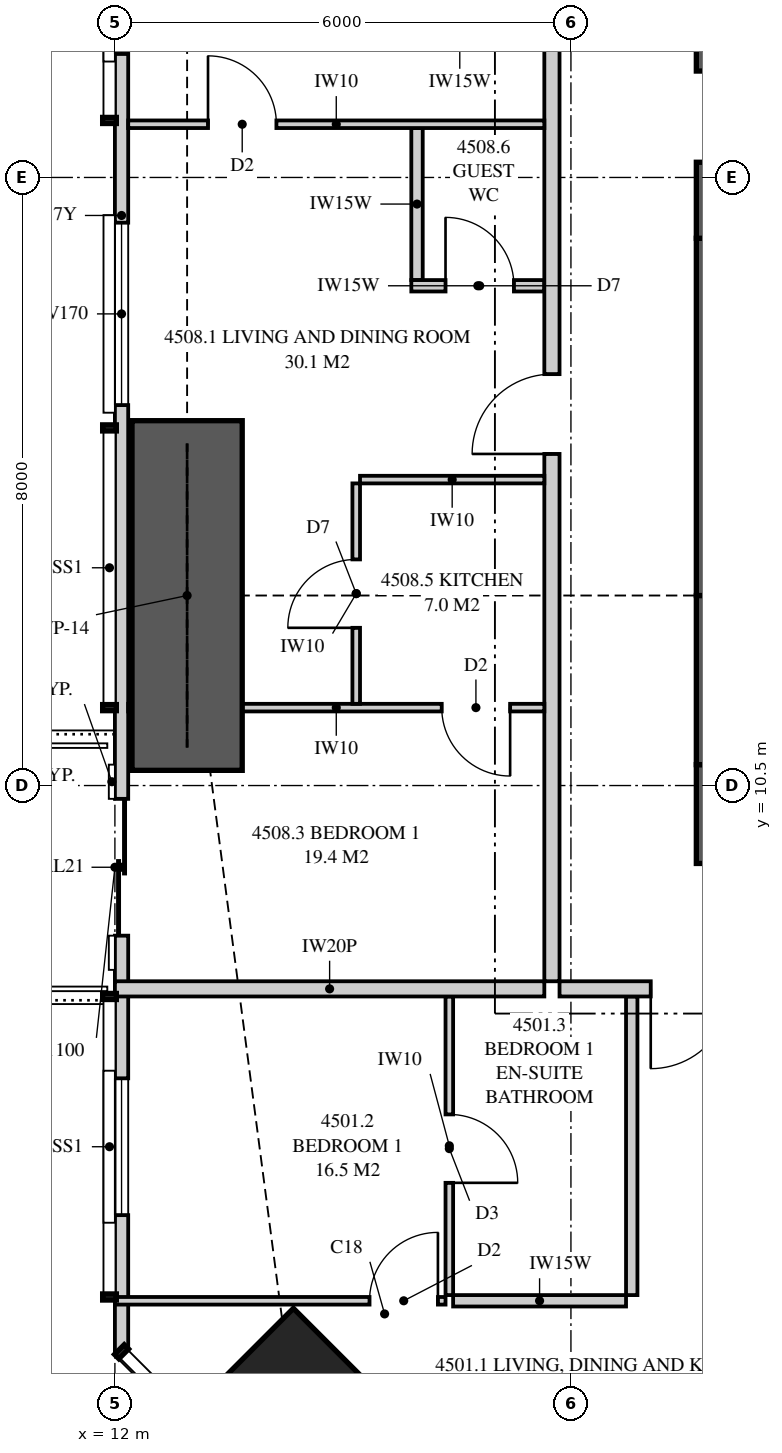
"""IFC4 building model, lengths in metres.
Left out: names, types, materials, properties, quantities, classifications, styles, units other than length and angle.
Written with IfcOpenShell. Run it as: python <this file> out.ifc"""

import sys

from ifc_helpers import new_model, si_unit, direction, frame, frame_2d, origin, origin_2d, place, context, subcontext, project, spatial, polyline, rectangle, outline, extrude, element, fill, save


model = new_model("IFC4")
c1 = context("Model", 3, precision=1e-05, world=origin(), true_north=direction((0.0, 1.0)))
c2 = subcontext(c1, "Body", "Model", "MODEL_VIEW")
j1 = project(units=[si_unit("LENGTHUNIT", "METRE"), si_unit("PLANEANGLEUNIT", "RADIAN")], contexts=[c1])
p1 = place(None, origin())
s1 = spatial("IfcSite", under=j1, at=p1, CompositionType="ELEMENT")
p2 = place(p1, origin())
s2 = spatial("IfcBuilding", under=s1, at=p2, CompositionType="ELEMENT")
p3 = place(p2, frame((0.0, 0.0, 167.75)))
s3 = spatial("IfcBuildingStorey", under=s2, at=p3, CompositionType="ELEMENT", Elevation=167.75)
p4 = place(p3, frame((14.348, 2.348, 0.0), z_axis=(0.0, 0.0, 1.0), x_axis=(0.707106781187, 0.707106781187, 0.0)))
e1 = element("IfcColumn", 1, at=p4, inside=s3, PredefinedType="COLUMN", context=c2, shape_type="SweptSolid", body=[
    extrude(rectangle(XDim=1.8, YDim=1.8, at=origin_2d()), origin(), (0.0, 0.0, 1.0), 3.35),
])
p5 = place(p3, frame((19.65, 10.125, 0.0), z_axis=(0.0, 0.0, 1.0), x_axis=(1.0, 0.0, 0.0)))
e2 = element("IfcWall", 2, at=p5, inside=s3, PredefinedType="SHEAR", context=c2, shape_type="SweptSolid", body=[
    extrude(rectangle(XDim=6.35, YDim=1.3, at=frame_2d((3.175, 0.0))), origin(), (0.0, 0.0, 1.0), 3.35),
])
p6 = place(p5, frame((4.775, 0.0, 0.0)))
e3 = element("IfcOpeningElement", 3, at=p6, cuts=e2, PredefinedType="OPENING", context=c2, shape_type="SweptSolid", body=[
    extrude(rectangle(XDim=0.75, YDim=2.1, at=frame_2d((0.375, 1.05))), frame((0.0, 0.66, 0.0), z_axis=(0.0, -1.0, 0.0), x_axis=(1.0, 0.0, 0.0)), (0.0, 0.0, 1.0), 1.32),
])
p7 = place(p3, frame((20.0, 23.3, 0.0), z_axis=(0.0, 0.0, 1.0), x_axis=(0.0, -1.0, 0.0)))
e4 = element("IfcWall", 4, at=p7, inside=s3, PredefinedType="SHEAR", context=c2, shape_type="SweptSolid", body=[
    extrude(rectangle(XDim=5.6, YDim=0.7, at=frame_2d((2.8, 0.0))), origin(), (0.0, 0.0, 1.0), 3.35),
])
p8 = place(p7, frame((3.4, 0.0, 0.0)))
e5 = element("IfcOpeningElement", 5, at=p8, cuts=e4, PredefinedType="OPENING", context=c2, shape_type="SweptSolid", body=[
    extrude(rectangle(XDim=1.2, YDim=2.2, at=frame_2d((0.6, 1.1))), frame((0.0, 0.36, 0.0), z_axis=(0.0, -1.0, 0.0), x_axis=(1.0, 0.0, 0.0)), (0.0, 0.0, 1.0), 0.72),
])
p9 = place(p3, frame((20.0, 17.7, 0.0), z_axis=(0.0, 0.0, 1.0), x_axis=(0.0, -1.0, 0.0)))
e6 = element("IfcWall", 6, at=p9, inside=s3, PredefinedType="SHEAR", context=c2, shape_type="SweptSolid", body=[
    extrude(rectangle(XDim=4.7, YDim=0.7, at=frame_2d((2.35, 0.0))), origin(), (0.0, 0.0, 1.0), 3.35),
])
p10 = place(p3, frame((20.0, 13.0, 0.0), z_axis=(0.0, 0.0, 1.0), x_axis=(0.0, -1.0, 0.0)))
e7 = element("IfcWall", 7, at=p10, inside=s3, PredefinedType="SHEAR", context=c2, shape_type="SweptSolid", body=[
    extrude(rectangle(XDim=2.225, YDim=0.7, at=frame_2d((1.113, 0.0))), origin(), (0.0, 0.0, 1.0), 3.35),
])
p11 = place(p3, frame((12.087, 32.949, 0.0), z_axis=(0.0, 0.0, 1.0), x_axis=(0.0, -1.0, 0.0)))
e8 = element("IfcWall", 8, at=p11, inside=s3, PredefinedType="SOLIDWALL", context=c2, shape_type="SweptSolid", body=[
    extrude(outline(polyline([(0.0, 0.0), (29.897, 0.0), (29.897, 3.11), (20.191, 3.11), (20.191, 2.15), (20.051, 2.15), (20.051, 3.11), (19.949, 3.11), (19.949, 2.15), (7.949, 2.15), (7.949, 3.11), (7.823, 3.11), (7.823, 2.15), (7.73, 2.15), (7.73, 3.11), (0.0, 3.11), (0.0, 0.0)])), frame((0.0, 0.087, 0.0), z_axis=(0.0, -1.0, 0.0), x_axis=(1.0, 0.0, 0.0)), (0.0, 0.0, 1.0), 0.175),
])
p12 = place(p11, frame((1.297, 0.0, 0.4)))
e9 = element("IfcOpeningElement", 9, at=p12, cuts=e8, PredefinedType="OPENING", context=c2, shape_type="SweptSolid", body=[
    extrude(rectangle(XDim=1.8, YDim=1.7, at=frame_2d((0.9, 0.85))), frame((0.0, 0.097, 0.0), z_axis=(0.0, -1.0, 0.0), x_axis=(1.0, 0.0, 0.0)), (0.0, 0.0, 1.0), 0.195),
])
p13 = place(p11, frame((4.349, 0.0, 0.4)))
e10 = element("IfcOpeningElement", 10, at=p13, cuts=e8, PredefinedType="OPENING", context=c2, shape_type="SweptSolid", body=[
    extrude(rectangle(XDim=1.2, YDim=1.7, at=frame_2d((0.6, 0.85))), frame((0.0, 0.097, 0.0), z_axis=(0.0, -1.0, 0.0), x_axis=(1.0, 0.0, 0.0)), (0.0, 0.0, 1.0), 0.195),
])
p14 = place(p11, frame((11.024, 0.0, 0.4)))
e11 = element("IfcOpeningElement", 11, at=p14, cuts=e8, PredefinedType="OPENING", context=c2, shape_type="SweptSolid", body=[
    extrude(rectangle(XDim=1.8, YDim=1.7, at=frame_2d((0.9, 0.85))), frame((0.0, 0.097, 0.0), z_axis=(0.0, -1.0, 0.0), x_axis=(1.0, 0.0, 0.0)), (0.0, 0.0, 1.0), 0.195),
])
p15 = place(p11, frame((15.044, 0.0, 0.4)))
e12 = element("IfcOpeningElement", 12, at=p15, cuts=e8, PredefinedType="OPENING", context=c2, shape_type="SweptSolid", body=[
    extrude(rectangle(XDim=2.4, YDim=1.7, at=frame_2d((1.2, 0.85))), frame((0.0, 0.097, 0.0), z_axis=(0.0, -1.0, 0.0), x_axis=(1.0, 0.0, 0.0)), (0.0, 0.0, 1.0), 0.195),
])
p16 = place(p11, frame((22.624, 0.0, 0.0)))
e13 = element("IfcOpeningElement", 13, at=p16, cuts=e8, PredefinedType="OPENING", context=c2, shape_type="SweptSolid", body=[
    extrude(rectangle(XDim=1.8, YDim=2.1, at=frame_2d((0.9, 1.05))), frame((0.0, 0.097, 0.0), z_axis=(0.0, -1.0, 0.0), x_axis=(1.0, 0.0, 0.0)), (0.0, 0.0, 1.0), 0.195),
])
p17 = place(p11, frame((26.301, 0.0, 0.4)))
e14 = element("IfcOpeningElement", 14, at=p17, cuts=e8, PredefinedType="OPENING", context=c2, shape_type="SweptSolid", body=[
    extrude(rectangle(XDim=1.8, YDim=1.7, at=frame_2d((0.9, 0.85))), frame((0.0, 0.097, 0.0), z_axis=(0.0, -1.0, 0.0), x_axis=(1.0, 0.0, 0.0)), (0.0, 0.0, 1.0), 0.195),
])
p18 = place(p3, frame((17.85, 7.825, 0.0), z_axis=(0.0, 0.0, 1.0), x_axis=(1.0, 0.0, 0.0)))
e15 = element("IfcWall", 15, at=p18, inside=s3, PredefinedType="PARTITIONING", context=c2, shape_type="SweptSolid", body=[
    extrude(rectangle(XDim=3.25, YDim=0.2, at=frame_2d((1.625, 0.0))), origin(), (0.0, 0.0, 1.0), 3.11),
])
p19 = place(p18, frame((1.2, 0.0, 0.0)))
e16 = element("IfcOpeningElement", 16, at=p19, cuts=e15, PredefinedType="OPENING", context=c2, shape_type="SweptSolid", body=[
    extrude(rectangle(XDim=1.05, YDim=2.2, at=frame_2d((0.525, 1.1))), frame((0.0, 0.11, 0.0), z_axis=(0.0, -1.0, 0.0), x_axis=(1.0, 0.0, 0.0)), (0.0, 0.0, 1.0), 0.22),
])
p20 = place(p3, frame((16.4, 3.796, 0.0), z_axis=(0.0, 0.0, 1.0), x_axis=(0.0, 1.0, 0.0)))
e17 = element("IfcWall", 17, at=p20, inside=s3, PredefinedType="PARTITIONING", context=c2, shape_type="SweptSolid", body=[
    extrude(rectangle(XDim=3.929, YDim=0.1, at=frame_2d((1.964, 0.0))), origin(), (0.0, 0.0, 1.0), 3.11),
])
p21 = place(p20, frame((1.477, 0.0, 0.0)))
e18 = element("IfcOpeningElement", 18, at=p21, cuts=e17, PredefinedType="OPENING", context=c2, shape_type="SweptSolid", body=[
    extrude(rectangle(XDim=0.9, YDim=2.1, at=frame_2d((0.45, 1.05))), frame((0.0, 0.06, 0.0), z_axis=(0.0, -1.0, 0.0), x_axis=(1.0, 0.0, 0.0)), (0.0, 0.0, 1.0), 0.12),
])
p22 = place(p3, frame((16.35, 3.721, 0.0), z_axis=(0.0, 0.0, 1.0), x_axis=(-1.0, 0.0, 0.0)))
e19 = element("IfcWall", 19, at=p22, inside=s3, PredefinedType="PARTITIONING", context=c2, shape_type="SweptSolid", body=[
    extrude(outline(polyline([(0.0, 0.0), (4.35, 0.0), (4.35, 3.11), (3.049, 3.11), (3.049, 2.15), (1.314, 2.15), (1.314, 3.11), (0.0, 3.11), (0.0, 0.0)])), frame((0.0, 0.05, 0.0), z_axis=(0.0, -1.0, 0.0), x_axis=(1.0, 0.0, 0.0)), (0.0, 0.0, 1.0), 0.1),
])
p23 = place(p22, frame((0.1, 0.0, 0.0)))
e20 = element("IfcOpeningElement", 20, at=p23, cuts=e19, PredefinedType="OPENING", context=c2, shape_type="SweptSolid", body=[
    extrude(rectangle(XDim=0.9, YDim=2.1, at=frame_2d((0.45, 1.05))), frame((0.0, 0.06, 0.0), z_axis=(0.0, -1.0, 0.0), x_axis=(1.0, 0.0, 0.0)), (0.0, 0.0, 1.0), 0.12),
])
p24 = place(p3, frame((18.725, 3.721, 0.0), z_axis=(0.0, 0.0, 1.0), x_axis=(-1.0, 0.0, 0.0)))
e21 = element("IfcWall", 21, at=p24, inside=s3, PredefinedType="PLUMBINGWALL", context=c2, shape_type="SweptSolid", body=[
    extrude(rectangle(XDim=2.275, YDim=0.15, at=frame_2d((1.138, 0.0))), origin(), (0.0, 0.0, 1.0), 3.11),
])
p25 = place(p3, frame((18.8, 3.796, 0.0), z_axis=(0.0, 0.0, 1.0), x_axis=(0.0, 1.0, 0.0)))
e22 = element("IfcWall", 22, at=p25, inside=s3, PredefinedType="PLUMBINGWALL", context=c2, shape_type="SweptSolid", body=[
    extrude(rectangle(XDim=3.929, YDim=0.15, at=frame_2d((1.964, 0.0))), origin(), (0.0, 0.0, 1.0), 3.11),
])
p26 = place(p3, frame((12.0, 7.825, 0.0), z_axis=(0.0, 0.0, 1.0), x_axis=(1.0, 0.0, 0.0)))
e23 = element("IfcWall", 23, at=p26, inside=s3, PredefinedType="PARTITIONING", context=c2, shape_type="SweptSolid", body=[
    extrude(outline(polyline([(0.0, 0.0), (5.65, 0.0), (5.65, 3.11), (2.547, 3.11), (2.547, 2.15), (0.712, 2.15), (0.712, 3.11), (0.0, 3.11), (0.0, 0.0)])), frame((0.0, 0.1, 0.0), z_axis=(0.0, -1.0, 0.0), x_axis=(1.0, 0.0, 0.0)), (0.0, 0.0, 1.0), 0.2),
])
p27 = place(p3, frame((17.75, 7.925, 0.0), z_axis=(0.0, 0.0, 1.0), x_axis=(0.0, 1.0, 0.0)))
e24 = element("IfcWall", 24, at=p27, inside=s3, PredefinedType="PARTITIONING", context=c2, shape_type="SweptSolid", body=[
    extrude(outline(polyline([(0.0, 0.0), (14.875, 0.0), (14.875, 3.11), (5.412, 3.11), (5.412, 2.541), (4.738, 2.541), (4.738, 3.11), (0.0, 3.11), (0.0, 0.0)])), frame((0.0, 0.1, 0.0), z_axis=(0.0, -1.0, 0.0), x_axis=(1.0, 0.0, 0.0)), (0.0, 0.0, 1.0), 0.2),
])
p28 = place(p27, frame((6.938, 0.0, 0.0)))
e25 = element("IfcOpeningElement", 25, at=p28, cuts=e24, PredefinedType="OPENING", context=c2, shape_type="SweptSolid", body=[
    extrude(rectangle(XDim=1.05, YDim=2.2, at=frame_2d((0.525, 1.1))), frame((0.0, 0.11, 0.0), z_axis=(0.0, -1.0, 0.0), x_axis=(1.0, 0.0, 0.0)), (0.0, 0.0, 1.0), 0.22),
])
p29 = place(p3, frame((12.175, 11.525, 0.0), z_axis=(0.0, 0.0, 1.0), x_axis=(1.0, 0.0, 0.0)))
e26 = element("IfcWall", 26, at=p29, inside=s3, PredefinedType="PARTITIONING", context=c2, shape_type="SweptSolid", body=[
    extrude(outline(polyline([(0.101, 3.11), (0.0, 3.11), (0.0, 0.0), (0.529, 0.0), (0.529, 0.269), (1.021, 0.269), (1.021, 0.0), (5.475, 0.0), (5.475, 3.11), (1.836, 3.11), (1.836, 2.15), (1.021, 2.15), (1.021, 1.881), (0.529, 1.881), (0.529, 2.15), (0.101, 2.15), (0.101, 3.11)])), frame((0.0, 0.05, 0.0), z_axis=(0.0, -1.0, 0.0), x_axis=(1.0, 0.0, 0.0)), (0.0, 0.0, 1.0), 0.1),
])
p30 = place(p29, frame((4.125, 0.0, 0.0)))
e27 = element("IfcOpeningElement", 27, at=p30, cuts=e26, PredefinedType="OPENING", context=c2, shape_type="SweptSolid", body=[
    extrude(rectangle(XDim=0.9, YDim=2.1, at=frame_2d((0.45, 1.05))), frame((0.0, 0.06, 0.0), z_axis=(0.0, -1.0, 0.0), x_axis=(1.0, 0.0, 0.0)), (0.0, 0.0, 1.0), 0.12),
])
p31 = place(p3, frame((12.175, 19.2, 0.0), z_axis=(0.0, 0.0, 1.0), x_axis=(1.0, 0.0, 0.0)))
e28 = element("IfcWall", 28, at=p31, inside=s3, PredefinedType="PARTITIONING", context=c2, shape_type="SweptSolid", body=[
    extrude(outline(polyline([(0.0, 0.0), (5.475, 0.0), (5.475, 3.11), (1.635, 3.11), (1.635, 2.15), (0.0, 2.15), (0.0, 3.11), (0.0, 0.0)])), frame((0.0, 0.05, 0.0), z_axis=(0.0, -1.0, 0.0), x_axis=(1.0, 0.0, 0.0)), (0.0, 0.0, 1.0), 0.1),
])
p32 = place(p31, frame((1.05, 0.0, 0.0)))
e29 = element("IfcOpeningElement", 29, at=p32, cuts=e28, PredefinedType="OPENING", context=c2, shape_type="SweptSolid", body=[
    extrude(rectangle(XDim=0.9, YDim=2.1, at=frame_2d((0.45, 1.05))), frame((0.0, 0.06, 0.0), z_axis=(0.0, -1.0, 0.0), x_axis=(1.0, 0.0, 0.0)), (0.0, 0.0, 1.0), 0.12),
])
p33 = place(p3, frame((15.175, 11.575, 0.0), z_axis=(0.0, 0.0, 1.0), x_axis=(0.0, 1.0, 0.0)))
e30 = element("IfcWall", 30, at=p33, inside=s3, PredefinedType="PARTITIONING", context=c2, shape_type="SweptSolid", body=[
    extrude(outline(polyline([(0.0, 0.0), (2.9, 0.0), (2.9, 3.11), (1.712, 3.11), (1.712, 2.541), (1.138, 2.541), (1.138, 3.11), (0.0, 3.11), (0.0, 0.0)])), frame((0.0, 0.05, 0.0), z_axis=(0.0, -1.0, 0.0), x_axis=(1.0, 0.0, 0.0)), (0.0, 0.0, 1.0), 0.1),
])
p34 = place(p33, frame((1.0, 0.0, 0.0)))
e31 = element("IfcOpeningElement", 31, at=p34, cuts=e30, PredefinedType="OPENING", context=c2, shape_type="SweptSolid", body=[
    extrude(rectangle(XDim=0.9, YDim=2.1, at=frame_2d((0.45, 1.05))), frame((0.0, 0.06, 0.0), z_axis=(0.0, -1.0, 0.0), x_axis=(1.0, 0.0, 0.0)), (0.0, 0.0, 1.0), 0.12),
])
p35 = place(p3, frame((15.225, 14.525, 0.0), z_axis=(0.0, 0.0, 1.0), x_axis=(1.0, 0.0, 0.0)))
e32 = element("IfcWall", 32, at=p35, inside=s3, PredefinedType="PARTITIONING", context=c2, shape_type="SweptSolid", body=[
    extrude(rectangle(XDim=2.425, YDim=0.1, at=frame_2d((1.212, 0.0))), origin(), (0.0, 0.0, 1.0), 3.11),
])
p36 = place(p3, frame((17.65, 17.075, 0.0), z_axis=(0.0, 0.0, 1.0), x_axis=(-1.0, 0.0, 0.0)))
e33 = element("IfcWall", 33, at=p36, inside=s3, PredefinedType="PLUMBINGWALL", context=c2, shape_type="SweptSolid", body=[
    extrude(rectangle(XDim=1.75, YDim=0.15, at=frame_2d((0.875, 0.0))), origin(), (0.0, 0.0, 1.0), 3.11),
])
p37 = place(p36, frame((0.4, 0.0, 0.0)))
e34 = element("IfcOpeningElement", 34, at=p37, cuts=e33, PredefinedType="OPENING", context=c2, shape_type="SweptSolid", body=[
    extrude(rectangle(XDim=0.9, YDim=2.1, at=frame_2d((0.45, 1.05))), frame((0.0, 0.085, 0.0), z_axis=(0.0, -1.0, 0.0), x_axis=(1.0, 0.0, 0.0)), (0.0, 0.0, 1.0), 0.17),
])
p38 = place(p3, frame((15.975, 19.15, 0.0), z_axis=(0.0, 0.0, 1.0), x_axis=(0.0, -1.0, 0.0)))
e35 = element("IfcWall", 35, at=p38, inside=s3, PredefinedType="PLUMBINGWALL", context=c2, shape_type="SweptSolid", body=[
    extrude(rectangle(XDim=2.0, YDim=0.15, at=frame_2d((1.0, 0.0))), origin(), (0.0, 0.0, 1.0), 3.11),
])
p39 = place(p3, frame((12.95, 10.7, 0.0), z_axis=(0.0, 0.0, 1.0), x_axis=(0.0, 1.0, 0.0)))
e36 = element("IfcWall", 36, at=p39, inside=s3, PredefinedType="SHEAR", context=c2, shape_type="SweptSolid", body=[
    extrude(rectangle(XDim=4.6, YDim=1.45, at=frame_2d((2.3, 0.0))), origin(), (0.0, 0.0, 1.0), 3.35),
])
p40 = place(p14, origin())
e37 = element("IfcWindow", 37, at=p40, inside=s3, PartitioningType="SINGLE_PANEL", PredefinedType="WINDOW", context=c2, shape_type="SweptSolid", body=[
    extrude(rectangle(XDim=1.8, YDim=1.7, at=frame_2d((0.9, 0.85))), frame((0.0, 0.03, 0.0), z_axis=(0.0, -1.0, 0.0), x_axis=(1.0, 0.0, 0.0)), (0.0, 0.0, 1.0), 0.06),
])
fill(e11, e37)
p41 = place(p15, origin())
e38 = element("IfcWindow", 38, at=p41, inside=s3, PartitioningType="SINGLE_PANEL", PredefinedType="WINDOW", context=c2, shape_type="SweptSolid", body=[
    extrude(rectangle(XDim=2.4, YDim=1.7, at=frame_2d((1.2, 0.85))), frame((0.0, 0.03, 0.0), z_axis=(0.0, -1.0, 0.0), x_axis=(1.0, 0.0, 0.0)), (0.0, 0.0, 1.0), 0.06),
])
fill(e12, e38)
p42 = place(p16, origin())
e39 = element("IfcDoor", 39, at=p42, inside=s3, OperationType="SLIDING_TO_LEFT", PredefinedType="DOOR", context=c2, shape_type="SweptSolid", body=[
    extrude(rectangle(XDim=1.8, YDim=2.1, at=frame_2d((0.9, 1.05))), frame((0.0, 0.025, 0.0), z_axis=(0.0, -1.0, 0.0), x_axis=(1.0, 0.0, 0.0)), (0.0, 0.0, 1.0), 0.05),
])
fill(e13, e39)
p43 = place(p17, origin())
e40 = element("IfcWindow", 40, at=p43, inside=s3, PartitioningType="SINGLE_PANEL", PredefinedType="WINDOW", context=c2, shape_type="SweptSolid", body=[
    extrude(rectangle(XDim=1.8, YDim=1.7, at=frame_2d((0.9, 0.85))), frame((0.0, 0.03, 0.0), z_axis=(0.0, -1.0, 0.0), x_axis=(1.0, 0.0, 0.0)), (0.0, 0.0, 1.0), 0.06),
])
fill(e14, e40)
p44 = place(p19, frame((1.05, 0.0, 0.0), z_axis=(0.0, 0.0, 1.0), x_axis=(-1.0, 0.0, 0.0)))
e41 = element("IfcDoor", 41, at=p44, inside=s3, OperationType="SINGLE_SWING_RIGHT", PredefinedType="DOOR", context=c2, shape_type="SweptSolid", body=[
    extrude(rectangle(XDim=1.05, YDim=2.2, at=frame_2d((0.525, 1.1))), frame((0.0, 0.025, 0.0), z_axis=(0.0, -1.0, 0.0), x_axis=(1.0, 0.0, 0.0)), (0.0, 0.0, 1.0), 0.05),
])
fill(e16, e41)
p45 = place(p23, frame((0.9, 0.0, 0.0), z_axis=(0.0, 0.0, 1.0), x_axis=(-1.0, 0.0, 0.0)))
e42 = element("IfcDoor", 42, at=p45, inside=s3, OperationType="SINGLE_SWING_RIGHT", PredefinedType="DOOR", context=c2, shape_type="SweptSolid", body=[
    extrude(rectangle(XDim=0.9, YDim=2.1, at=frame_2d((0.45, 1.05))), frame((0.0, 0.025, 0.0), z_axis=(0.0, -1.0, 0.0), x_axis=(1.0, 0.0, 0.0)), (0.0, 0.0, 1.0), 0.05),
])
fill(e20, e42)
p46 = place(p21, frame((0.9, 0.0, 0.0), z_axis=(0.0, 0.0, 1.0), x_axis=(-1.0, 0.0, 0.0)))
e43 = element("IfcDoor", 43, at=p46, inside=s3, OperationType="SINGLE_SWING_RIGHT", PredefinedType="DOOR", context=c2, shape_type="SweptSolid", body=[
    extrude(rectangle(XDim=0.9, YDim=2.1, at=frame_2d((0.45, 1.05))), frame((0.0, 0.025, 0.0), z_axis=(0.0, -1.0, 0.0), x_axis=(1.0, 0.0, 0.0)), (0.0, 0.0, 1.0), 0.05),
])
fill(e18, e43)
p47 = place(p28, origin())
e44 = element("IfcDoor", 44, at=p47, inside=s3, OperationType="SINGLE_SWING_LEFT", PredefinedType="DOOR", context=c2, shape_type="SweptSolid", body=[
    extrude(rectangle(XDim=1.05, YDim=2.2, at=frame_2d((0.525, 1.1))), frame((0.0, 0.025, 0.0), z_axis=(0.0, -1.0, 0.0), x_axis=(1.0, 0.0, 0.0)), (0.0, 0.0, 1.0), 0.05),
])
fill(e25, e44)
p48 = place(p30, frame((0.9, 0.0, 0.0), z_axis=(0.0, 0.0, 1.0), x_axis=(-1.0, 0.0, 0.0)))
e45 = element("IfcDoor", 45, at=p48, inside=s3, OperationType="SINGLE_SWING_LEFT", PredefinedType="DOOR", context=c2, shape_type="SweptSolid", body=[
    extrude(rectangle(XDim=0.9, YDim=2.1, at=frame_2d((0.45, 1.05))), frame((0.0, 0.025, 0.0), z_axis=(0.0, -1.0, 0.0), x_axis=(1.0, 0.0, 0.0)), (0.0, 0.0, 1.0), 0.05),
])
fill(e27, e45)
p49 = place(p32, origin())
e46 = element("IfcDoor", 46, at=p49, inside=s3, OperationType="SINGLE_SWING_LEFT", PredefinedType="DOOR", context=c2, shape_type="SweptSolid", body=[
    extrude(rectangle(XDim=0.9, YDim=2.1, at=frame_2d((0.45, 1.05))), frame((0.0, 0.025, 0.0), z_axis=(0.0, -1.0, 0.0), x_axis=(1.0, 0.0, 0.0)), (0.0, 0.0, 1.0), 0.05),
])
fill(e29, e46)
p50 = place(p34, origin())
e47 = element("IfcDoor", 47, at=p50, inside=s3, OperationType="SINGLE_SWING_LEFT", PredefinedType="DOOR", context=c2, shape_type="SweptSolid", body=[
    extrude(rectangle(XDim=0.9, YDim=2.1, at=frame_2d((0.45, 1.05))), frame((0.0, 0.025, 0.0), z_axis=(0.0, -1.0, 0.0), x_axis=(1.0, 0.0, 0.0)), (0.0, 0.0, 1.0), 0.05),
])
fill(e31, e47)
p51 = place(p37, frame((0.9, 0.0, 0.0), z_axis=(0.0, 0.0, 1.0), x_axis=(-1.0, 0.0, 0.0)))
e48 = element("IfcDoor", 48, at=p51, inside=s3, OperationType="SINGLE_SWING_LEFT", PredefinedType="DOOR", context=c2, shape_type="SweptSolid", body=[
    extrude(rectangle(XDim=0.9, YDim=2.1, at=frame_2d((0.45, 1.05))), frame((0.0, 0.025, 0.0), z_axis=(0.0, -1.0, 0.0), x_axis=(1.0, 0.0, 0.0)), (0.0, 0.0, 1.0), 0.05),
])
fill(e34, e48)
save(model, sys.argv[1])
